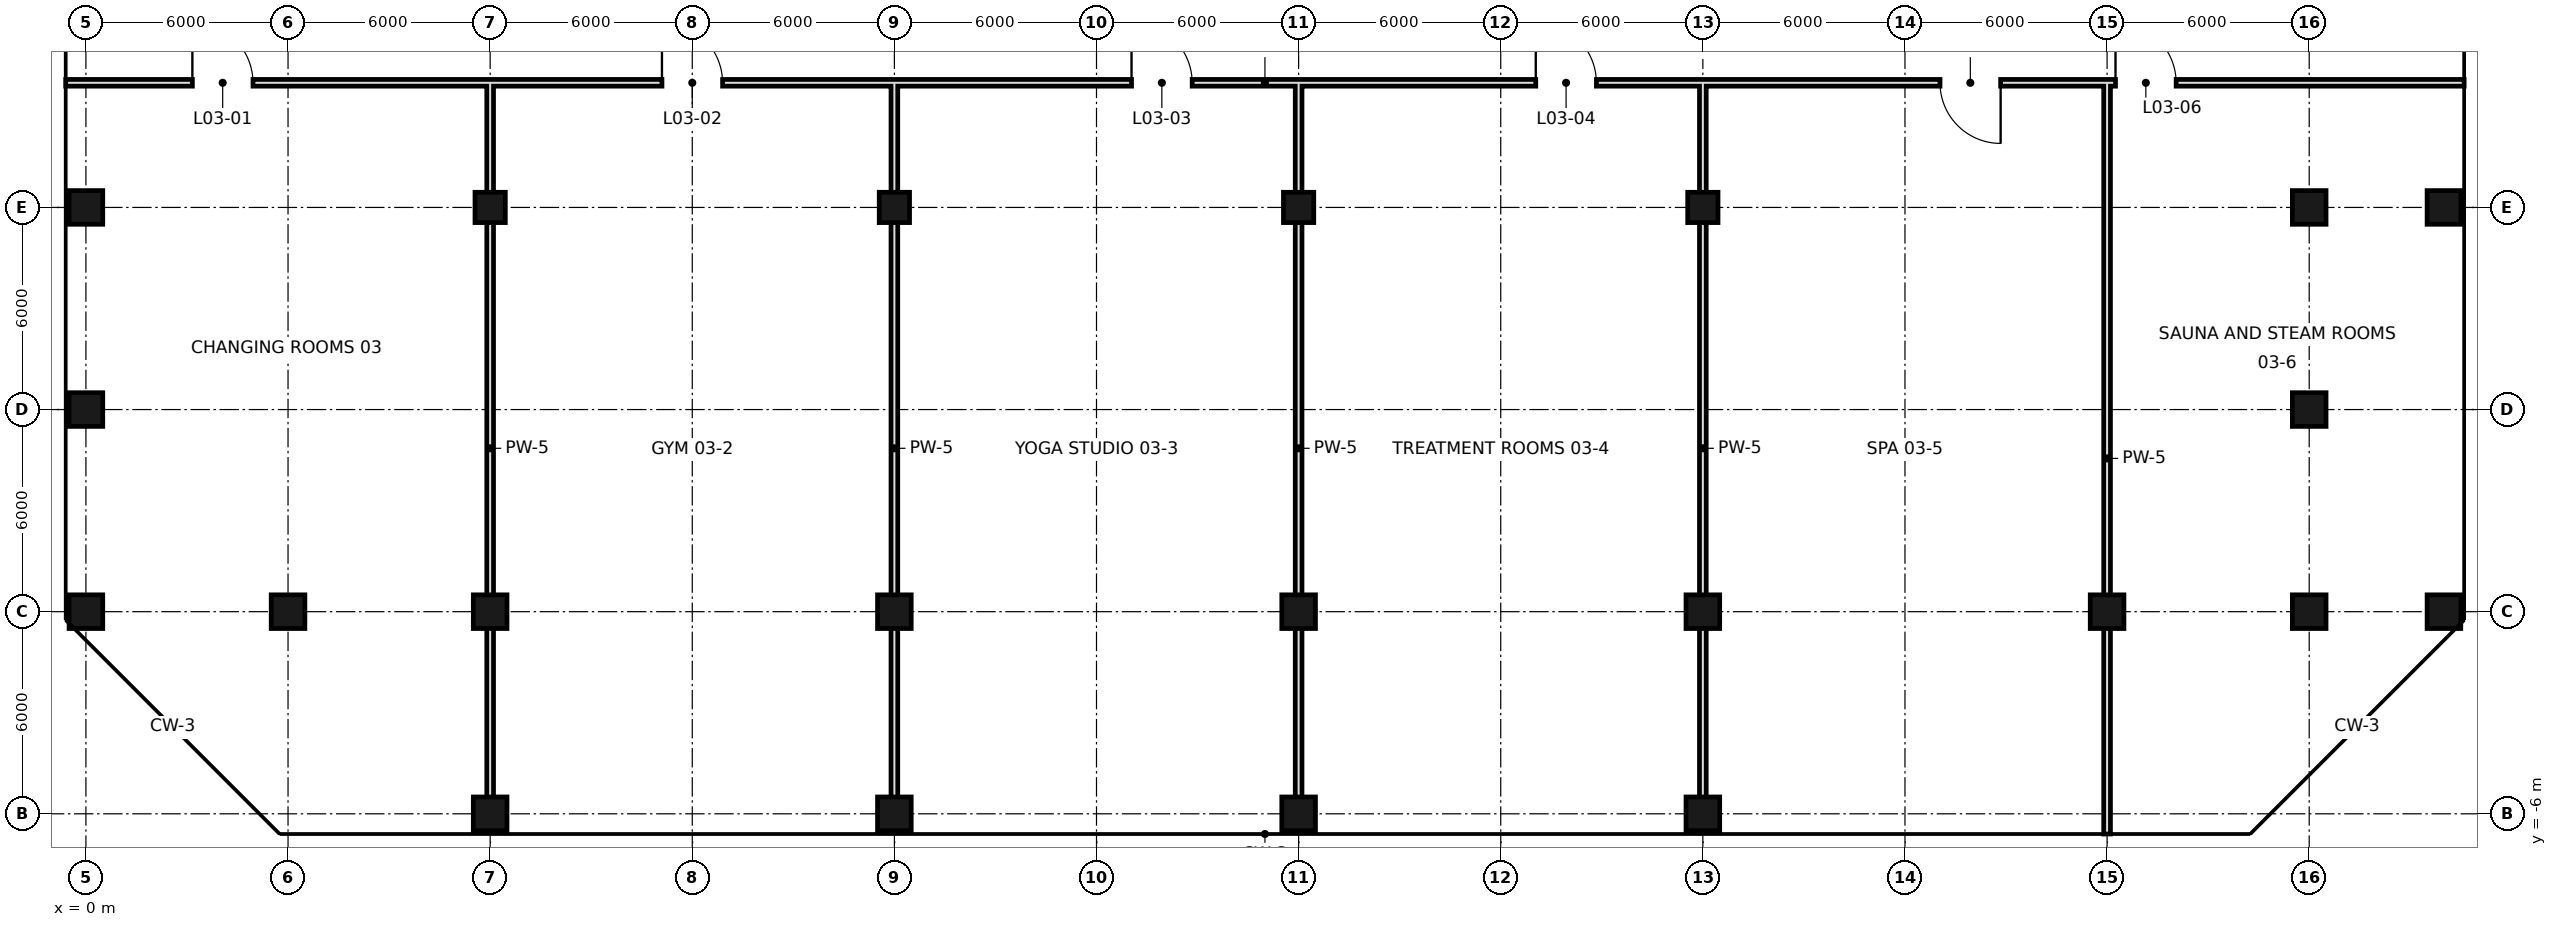
"""IFC4 building model, lengths in metres.
Left out: names, types, materials, properties, quantities, classifications, styles, units other than length and angle.
Written with IfcOpenShell. Run it as: python <this file> out.ifc"""

import sys

from ifc_helpers import new_model, si_unit, direction, frame, frame_2d, origin, origin_2d, place, context, subcontext, project, spatial, rectangle, hollow_rectangle, extrude, element, fill, save


model = new_model("IFC4")
c1 = context("Model", 3, precision=1e-05, world=origin(), true_north=direction((0.0, 1.0)))
c2 = subcontext(c1, "Body", "Model", "MODEL_VIEW")
j1 = project(units=[si_unit("LENGTHUNIT", "METRE"), si_unit("PLANEANGLEUNIT", "RADIAN")], contexts=[c1])
p1 = place(None, origin())
s1 = spatial("IfcSite", under=j1, at=p1, CompositionType="ELEMENT")
p2 = place(p1, origin())
s2 = spatial("IfcBuilding", under=s1, at=p2, CompositionType="ELEMENT")
p3 = place(p2, frame((0.0, 0.0, 25.2)))
s3 = spatial("IfcBuildingStorey", under=s2, at=p3, CompositionType="ELEMENT", Elevation=25.2)
for number, where, z_axis, x_axis in (
    (1, (0.0, 0.0, 0.0), (0.0, 0.0, 1.0), (1.0, 0.0, 0.0)),
    (2, (0.0, 6.0, 0.0), (0.0, 0.0, 1.0), (1.0, 0.0, 0.0)),
    (3, (0.0, 12.0, 0.0), (0.0, 0.0, 1.0), (1.0, 0.0, 0.0)),
    (4, (6.0, 0.0, 0.0), (0.0, 0.0, 1.0), (1.0, 0.0, 0.0)),
    (5, (12.0, -6.0, 0.0), (0.0, 0.0, 1.0), (1.0, 0.0, 0.0)),
    (6, (12.0, 0.0, 0.0), (0.0, 0.0, 1.0), (1.0, 0.0, 0.0)),
):
    element("IfcColumn", number, at=place(p3, frame(where, z_axis=z_axis, x_axis=x_axis)), inside=s3, PredefinedType="COLUMN", context=c2, shape_type="SweptSolid", body=[
        extrude(hollow_rectangle(XDim=1.0, YDim=1.0, WallThickness=0.05, at=origin_2d()), origin(), (0.0, 0.0, 1.0), 4.8),
    ])
p4 = place(p3, frame((12.0, 12.0, 0.0), z_axis=(0.0, 0.0, 1.0), x_axis=(1.0, 0.0, 0.0)))
e7 = element("IfcColumn", 7, at=p4, inside=s3, PredefinedType="COLUMN", context=c2, shape_type="SweptSolid", body=[
    extrude(hollow_rectangle(XDim=0.9, YDim=0.9, WallThickness=0.045, at=origin_2d()), origin(), (0.0, 0.0, 1.0), 4.8),
])
for number, where, z_axis, x_axis in (
    (8, (24.0, -6.0, 0.0), (0.0, 0.0, 1.0), (1.0, 0.0, 0.0)),
    (9, (24.0, 0.0, 0.0), (0.0, 0.0, 1.0), (1.0, 0.0, 0.0)),
):
    element("IfcColumn", number, at=place(p3, frame(where, z_axis=z_axis, x_axis=x_axis)), inside=s3, PredefinedType="COLUMN", context=c2, shape_type="SweptSolid", body=[
        extrude(hollow_rectangle(XDim=1.0, YDim=1.0, WallThickness=0.05, at=origin_2d()), origin(), (0.0, 0.0, 1.0), 4.8),
    ])
p5 = place(p3, frame((24.0, 12.0, 0.0), z_axis=(0.0, 0.0, 1.0), x_axis=(1.0, 0.0, 0.0)))
e10 = element("IfcColumn", 10, at=p5, inside=s3, PredefinedType="COLUMN", context=c2, shape_type="SweptSolid", body=[
    extrude(hollow_rectangle(XDim=0.9, YDim=0.9, WallThickness=0.045, at=origin_2d()), origin(), (0.0, 0.0, 1.0), 4.8),
])
for number, where, z_axis, x_axis in (
    (11, (36.0, -6.0, 0.0), (0.0, 0.0, 1.0), (1.0, 0.0, 0.0)),
    (12, (36.0, 0.0, 0.0), (0.0, 0.0, 1.0), (1.0, 0.0, 0.0)),
):
    element("IfcColumn", number, at=place(p3, frame(where, z_axis=z_axis, x_axis=x_axis)), inside=s3, PredefinedType="COLUMN", context=c2, shape_type="SweptSolid", body=[
        extrude(hollow_rectangle(XDim=1.0, YDim=1.0, WallThickness=0.05, at=origin_2d()), origin(), (0.0, 0.0, 1.0), 4.8),
    ])
p6 = place(p3, frame((36.0, 12.0, 0.0), z_axis=(0.0, 0.0, 1.0), x_axis=(1.0, 0.0, 0.0)))
e13 = element("IfcColumn", 13, at=p6, inside=s3, PredefinedType="COLUMN", context=c2, shape_type="SweptSolid", body=[
    extrude(hollow_rectangle(XDim=0.9, YDim=0.9, WallThickness=0.045, at=origin_2d()), origin(), (0.0, 0.0, 1.0), 4.8),
])
for number, where, z_axis, x_axis in (
    (14, (48.0, -6.0, 0.0), (0.0, 0.0, 1.0), (1.0, 0.0, 0.0)),
    (15, (48.0, 0.0, 0.0), (0.0, 0.0, 1.0), (1.0, 0.0, 0.0)),
):
    element("IfcColumn", number, at=place(p3, frame(where, z_axis=z_axis, x_axis=x_axis)), inside=s3, PredefinedType="COLUMN", context=c2, shape_type="SweptSolid", body=[
        extrude(hollow_rectangle(XDim=1.0, YDim=1.0, WallThickness=0.05, at=origin_2d()), origin(), (0.0, 0.0, 1.0), 4.8),
    ])
p7 = place(p3, frame((48.0, 12.0, 0.0), z_axis=(0.0, 0.0, 1.0), x_axis=(1.0, 0.0, 0.0)))
e16 = element("IfcColumn", 16, at=p7, inside=s3, PredefinedType="COLUMN", context=c2, shape_type="SweptSolid", body=[
    extrude(hollow_rectangle(XDim=0.9, YDim=0.9, WallThickness=0.045, at=origin_2d()), origin(), (0.0, 0.0, 1.0), 4.8),
])
for number, where, z_axis, x_axis in (
    (17, (60.0, 0.0, 0.0), (0.0, 0.0, 1.0), (1.0, 0.0, 0.0)),
    (18, (66.0, 0.0, 0.0), (0.0, 0.0, 1.0), (1.0, 0.0, 0.0)),
    (19, (66.0, 6.0, 0.0), (0.0, 0.0, 1.0), (1.0, 0.0, 0.0)),
    (20, (66.0, 12.0, 0.0), (0.0, 0.0, 1.0), (1.0, 0.0, 0.0)),
    (21, (70.0, 0.0, 0.0), (0.0, 0.0, 1.0), (1.0, 0.0, 0.0)),
    (22, (70.0, 12.0, 0.0), (0.0, 0.0, 1.0), (1.0, 0.0, 0.0)),
):
    element("IfcColumn", number, at=place(p3, frame(where, z_axis=z_axis, x_axis=x_axis)), inside=s3, PredefinedType="COLUMN", context=c2, shape_type="SweptSolid", body=[
        extrude(hollow_rectangle(XDim=1.0, YDim=1.0, WallThickness=0.05, at=origin_2d()), origin(), (0.0, 0.0, 1.0), 4.8),
    ])
for number, where, z_axis, x_axis in (
    (23, (12.0, -6.0, 0.0), (0.0, 0.0, 1.0), (0.0, 1.0, 0.0)),
    (24, (24.0, -6.0, 0.0), (0.0, 0.0, 1.0), (0.0, 1.0, 0.0)),
    (25, (36.0, -6.0, 0.0), (0.0, 0.0, 1.0), (0.0, 1.0, 0.0)),
    (26, (48.0, -6.0, 0.0), (0.0, 0.0, 1.0), (0.0, 1.0, 0.0)),
):
    element("IfcWall", number, at=place(p3, frame(where, z_axis=z_axis, x_axis=x_axis)), inside=s3, PredefinedType="SOLIDWALL", context=c2, shape_type="SweptSolid", body=[
        extrude(rectangle(XDim=21.7, YDim=0.2, at=frame_2d((10.85, 0.0))), origin(), (0.0, 0.0, 1.0), 3.7),
    ])
p8 = place(p3, frame((60.0, -6.6, 0.0), z_axis=(0.0, 0.0, 1.0), x_axis=(0.0, 1.0, 0.0)))
e27 = element("IfcWall", 27, at=p8, inside=s3, PredefinedType="SOLIDWALL", context=c2, shape_type="SweptSolid", body=[
    extrude(rectangle(XDim=22.3, YDim=0.2, at=frame_2d((11.15, 0.0))), origin(), (0.0, 0.0, 1.0), 3.5),
])
p9 = place(p3, frame((-0.6, 15.7, 0.0), z_axis=(0.0, 0.0, 1.0), x_axis=(1.0, 0.0, 0.0)))
e28 = element("IfcWall", 28, at=p9, inside=s3, PredefinedType="SOLIDWALL", context=c2, shape_type="SweptSolid", body=[
    extrude(rectangle(XDim=71.2, YDim=0.2, at=frame_2d((35.6, 0.0))), origin(), (0.0, 0.0, 1.0), 3.7),
])
p10 = place(p9, frame((3.76, 0.0, 0.0)))
e29 = element("IfcOpeningElement", 29, at=p10, cuts=e28, PredefinedType="OPENING", context=c2, shape_type="SweptSolid", body=[
    extrude(rectangle(XDim=1.8, YDim=2.4, at=frame_2d((0.9, 1.2))), frame((0.0, 0.11, 0.0), z_axis=(0.0, -1.0, 0.0), x_axis=(1.0, 0.0, 0.0)), (0.0, 0.0, 1.0), 0.22),
])
p11 = place(p9, frame((17.7, 0.0, 0.0)))
e30 = element("IfcOpeningElement", 30, at=p11, cuts=e28, PredefinedType="OPENING", context=c2, shape_type="SweptSolid", body=[
    extrude(rectangle(XDim=1.8, YDim=2.4, at=frame_2d((0.9, 1.2))), frame((0.0, 0.11, 0.0), z_axis=(0.0, -1.0, 0.0), x_axis=(1.0, 0.0, 0.0)), (0.0, 0.0, 1.0), 0.22),
])
p12 = place(p9, frame((31.64, 0.0, 0.0)))
e31 = element("IfcOpeningElement", 31, at=p12, cuts=e28, PredefinedType="OPENING", context=c2, shape_type="SweptSolid", body=[
    extrude(rectangle(XDim=1.8, YDim=2.4, at=frame_2d((0.9, 1.2))), frame((0.0, 0.11, 0.0), z_axis=(0.0, -1.0, 0.0), x_axis=(1.0, 0.0, 0.0)), (0.0, 0.0, 1.0), 0.22),
])
p13 = place(p9, frame((43.64, 0.0, 0.0)))
e32 = element("IfcOpeningElement", 32, at=p13, cuts=e28, PredefinedType="OPENING", context=c2, shape_type="SweptSolid", body=[
    extrude(rectangle(XDim=1.8, YDim=2.4, at=frame_2d((0.9, 1.2))), frame((0.0, 0.11, 0.0), z_axis=(0.0, -1.0, 0.0), x_axis=(1.0, 0.0, 0.0)), (0.0, 0.0, 1.0), 0.22),
])
p14 = place(p9, frame((55.64, 0.0, 0.0)))
e33 = element("IfcOpeningElement", 33, at=p14, cuts=e28, PredefinedType="OPENING", context=c2, shape_type="SweptSolid", body=[
    extrude(rectangle(XDim=1.8, YDim=2.4, at=frame_2d((0.9, 1.2))), frame((0.0, 0.11, 0.0), z_axis=(0.0, -1.0, 0.0), x_axis=(1.0, 0.0, 0.0)), (0.0, 0.0, 1.0), 0.22),
])
p15 = place(p9, frame((60.85, 0.0, 0.0)))
e34 = element("IfcOpeningElement", 34, at=p15, cuts=e28, PredefinedType="OPENING", context=c2, shape_type="SweptSolid", body=[
    extrude(rectangle(XDim=1.8, YDim=2.4, at=frame_2d((0.9, 1.2))), frame((0.0, 0.11, 0.0), z_axis=(0.0, -1.0, 0.0), x_axis=(1.0, 0.0, 0.0)), (0.0, 0.0, 1.0), 0.22),
])
p16 = place(p10, origin())
e35 = element("IfcDoor", 35, at=p16, inside=s3, OperationType="SINGLE_SWING_LEFT", PredefinedType="DOOR", context=c2, shape_type="SweptSolid", body=[
    extrude(rectangle(XDim=1.8, YDim=2.4, at=frame_2d((0.9, 1.2))), frame((0.0, 0.025, 0.0), z_axis=(0.0, -1.0, 0.0), x_axis=(1.0, 0.0, 0.0)), (0.0, 0.0, 1.0), 0.05),
])
fill(e29, e35)
p17 = place(p11, origin())
e36 = element("IfcDoor", 36, at=p17, inside=s3, OperationType="SINGLE_SWING_LEFT", PredefinedType="DOOR", context=c2, shape_type="SweptSolid", body=[
    extrude(rectangle(XDim=1.8, YDim=2.4, at=frame_2d((0.9, 1.2))), frame((0.0, 0.025, 0.0), z_axis=(0.0, -1.0, 0.0), x_axis=(1.0, 0.0, 0.0)), (0.0, 0.0, 1.0), 0.05),
])
fill(e30, e36)
p18 = place(p12, origin())
e37 = element("IfcDoor", 37, at=p18, inside=s3, OperationType="SINGLE_SWING_LEFT", PredefinedType="DOOR", context=c2, shape_type="SweptSolid", body=[
    extrude(rectangle(XDim=1.8, YDim=2.4, at=frame_2d((0.9, 1.2))), frame((0.0, 0.025, 0.0), z_axis=(0.0, -1.0, 0.0), x_axis=(1.0, 0.0, 0.0)), (0.0, 0.0, 1.0), 0.05),
])
fill(e31, e37)
p19 = place(p13, origin())
e38 = element("IfcDoor", 38, at=p19, inside=s3, OperationType="SINGLE_SWING_LEFT", PredefinedType="DOOR", context=c2, shape_type="SweptSolid", body=[
    extrude(rectangle(XDim=1.8, YDim=2.4, at=frame_2d((0.9, 1.2))), frame((0.0, 0.025, 0.0), z_axis=(0.0, -1.0, 0.0), x_axis=(1.0, 0.0, 0.0)), (0.0, 0.0, 1.0), 0.05),
])
fill(e32, e38)
p20 = place(p14, origin())
e39 = element("IfcDoor", 39, at=p20, inside=s3, OperationType="SINGLE_SWING_RIGHT", PredefinedType="DOOR", context=c2, shape_type="SweptSolid", body=[
    extrude(rectangle(XDim=1.8, YDim=2.4, at=frame_2d((0.9, 1.2))), frame((0.0, 0.025, 0.0), z_axis=(0.0, -1.0, 0.0), x_axis=(1.0, 0.0, 0.0)), (0.0, 0.0, 1.0), 0.05),
])
fill(e33, e39)
p21 = place(p15, origin())
e40 = element("IfcDoor", 40, at=p21, inside=s3, OperationType="SINGLE_SWING_LEFT", PredefinedType="DOOR", context=c2, shape_type="SweptSolid", body=[
    extrude(rectangle(XDim=1.8, YDim=2.4, at=frame_2d((0.9, 1.2))), frame((0.0, 0.025, 0.0), z_axis=(0.0, -1.0, 0.0), x_axis=(1.0, 0.0, 0.0)), (0.0, 0.0, 1.0), 0.05),
])
fill(e34, e40)
save(model, sys.argv[1])
